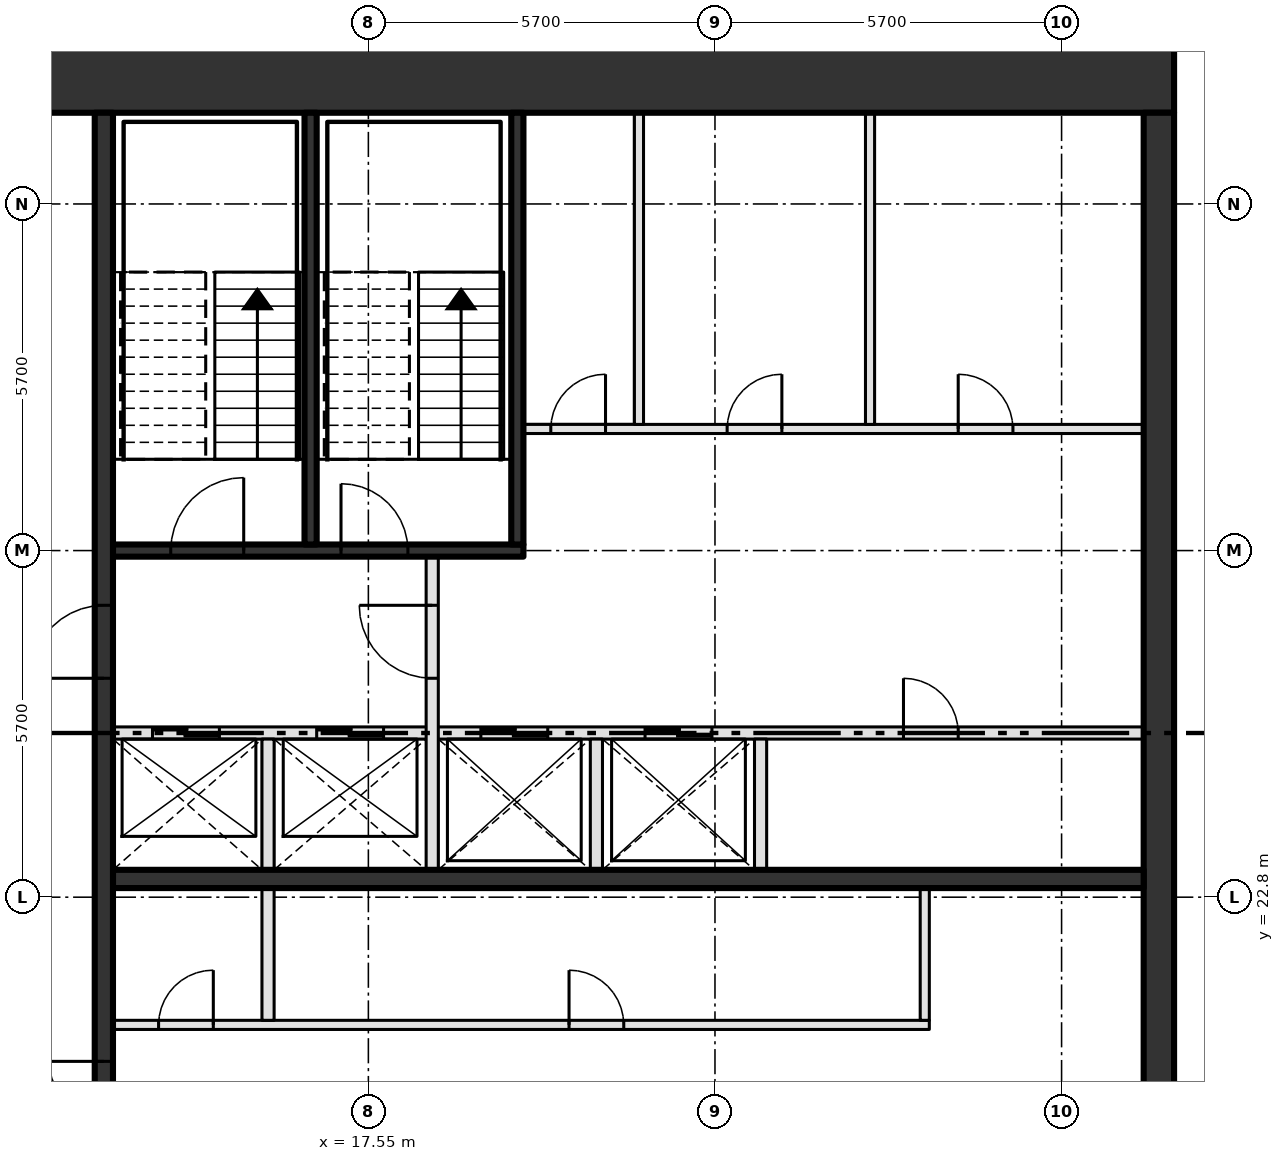
"""IFC4 building model, lengths in metres.
Left out: names, types, materials, properties, quantities, classifications, styles, units other than length and angle.
Written with IfcOpenShell. Run it as: python <this file> out.ifc"""

import sys

from ifc_helpers import new_model, si_unit, direction, frame, frame_2d, origin, place, context, subcontext, project, spatial, rectangle, extrude, element, fill, save


model = new_model("IFC4")
c1 = context("Model", 3, precision=1e-05, world=origin(), true_north=direction((0.0, 1.0)))
c2 = subcontext(c1, "Body", "Model", "MODEL_VIEW")
j1 = project(units=[si_unit("LENGTHUNIT", "METRE"), si_unit("PLANEANGLEUNIT", "RADIAN")], contexts=[c1])
p1 = place(None, origin())
s1 = spatial("IfcSite", under=j1, at=p1, CompositionType="ELEMENT")
p2 = place(p1, origin())
s2 = spatial("IfcBuilding", under=s1, at=p2, CompositionType="ELEMENT")
p3 = place(p2, frame((0.0, 0.0, 391.8)))
s3 = spatial("IfcBuildingStorey", under=s2, at=p3, CompositionType="ELEMENT", Elevation=391.8)
p4 = place(p3, frame((8.0, 36.3, -0.3), z_axis=(0.0, 0.0, 1.0), x_axis=(1.0, 0.0, 0.0)))
e1 = element("IfcWall", 1, at=p4, inside=s3, PredefinedType="SHEAR", context=c2, shape_type="SweptSolid", body=[
    extrude(rectangle(XDim=22.8, YDim=1.2, at=frame_2d((11.4, 0.0))), origin(), (0.0, 0.0, 1.0), 4.2),
])
p5 = place(p4, frame((2.3, 0.0, 0.3)))
e2 = element("IfcOpeningElement", 2, at=p5, cuts=e1, PredefinedType="OPENING", context=c2, shape_type="SweptSolid", body=[
    extrude(rectangle(XDim=1.8, YDim=2.1, at=frame_2d((0.9, 1.05))), frame((0.0, 0.61, 0.0), z_axis=(0.0, -1.0, 0.0), x_axis=(1.0, 0.0, 0.0)), (0.0, 0.0, 1.0), 1.22),
])
p6 = place(p3, frame((30.55, 14.6, -0.3), z_axis=(0.0, 0.0, 1.0), x_axis=(0.0, 1.0, 0.0)))
e3 = element("IfcWall", 3, at=p6, inside=s3, PredefinedType="SHEAR", context=c2, shape_type="SweptSolid", body=[
    extrude(rectangle(XDim=21.1, YDim=0.5, at=frame_2d((10.55, 0.0))), origin(), (0.0, 0.0, 1.0), 4.2),
])
p7 = place(p3, frame((13.35, 20.7, 0.0), z_axis=(0.0, 0.0, 1.0), x_axis=(1.0, 0.0, 0.0)))
e4 = element("IfcWall", 4, at=p7, inside=s3, PredefinedType="PARTITIONING", context=c2, shape_type="SweptSolid", body=[
    extrude(rectangle(XDim=13.425, YDim=0.15, at=frame_2d((6.712, 0.0))), origin(), (0.0, 0.0, 1.0), 3.9),
])
p8 = place(p7, frame((0.75, 0.0, 0.0)))
e5 = element("IfcOpeningElement", 5, at=p8, cuts=e4, PredefinedType="OPENING", context=c2, shape_type="SweptSolid", body=[
    extrude(rectangle(XDim=0.9, YDim=2.1, at=frame_2d((0.45, 1.05))), frame((0.0, 0.085, 0.0), z_axis=(0.0, -1.0, 0.0), x_axis=(1.0, 0.0, 0.0)), (0.0, 0.0, 1.0), 0.17),
])
p9 = place(p7, frame((7.5, 0.0, 0.0)))
e6 = element("IfcOpeningElement", 6, at=p9, cuts=e4, PredefinedType="OPENING", context=c2, shape_type="SweptSolid", body=[
    extrude(rectangle(XDim=0.9, YDim=2.1, at=frame_2d((0.45, 1.05))), frame((0.0, 0.085, 0.0), z_axis=(0.0, -1.0, 0.0), x_axis=(1.0, 0.0, 0.0)), (0.0, 0.0, 1.0), 0.17),
])
p10 = place(p3, frame((13.35, 23.1, 0.0), z_axis=(0.0, 0.0, 1.0), x_axis=(1.0, 0.0, 0.0)))
e7 = element("IfcWall", 7, at=p10, inside=s3, PredefinedType="SHEAR", context=c2, shape_type="SweptSolid", body=[
    extrude(rectangle(XDim=16.95, YDim=0.3, at=frame_2d((8.475, 0.0))), origin(), (0.0, 0.0, 1.0), 3.9),
])
p11 = place(p3, frame((13.35, 25.5, 0.0), z_axis=(0.0, 0.0, 1.0), x_axis=(1.0, 0.0, 0.0)))
e8 = element("IfcWall", 8, at=p11, inside=s3, PredefinedType="SOLIDWALL", context=c2, shape_type="SweptSolid", body=[
    extrude(rectangle(XDim=16.95, YDim=0.2, at=frame_2d((8.475, 0.0))), origin(), (0.0, 0.0, 1.0), 3.9),
])
p12 = place(p11, frame((0.65, 0.0, 0.0)))
e9 = element("IfcOpeningElement", 9, at=p12, cuts=e8, PredefinedType="OPENING", context=c2, shape_type="SweptSolid", body=[
    extrude(rectangle(XDim=1.1, YDim=2.1, at=frame_2d((0.55, 1.05))), frame((0.0, 0.11, 0.0), z_axis=(0.0, -1.0, 0.0), x_axis=(1.0, 0.0, 0.0)), (0.0, 0.0, 1.0), 0.22),
])
p13 = place(p11, frame((3.35, 0.0, 0.0)))
e10 = element("IfcOpeningElement", 10, at=p13, cuts=e8, PredefinedType="OPENING", context=c2, shape_type="SweptSolid", body=[
    extrude(rectangle(XDim=1.1, YDim=2.1, at=frame_2d((0.55, 1.05))), frame((0.0, 0.11, 0.0), z_axis=(0.0, -1.0, 0.0), x_axis=(1.0, 0.0, 0.0)), (0.0, 0.0, 1.0), 0.22),
])
p14 = place(p11, frame((6.05, 0.0, 0.0)))
e11 = element("IfcOpeningElement", 11, at=p14, cuts=e8, PredefinedType="OPENING", context=c2, shape_type="SweptSolid", body=[
    extrude(rectangle(XDim=1.1, YDim=2.1, at=frame_2d((0.55, 1.05))), frame((0.0, 0.11, 0.0), z_axis=(0.0, -1.0, 0.0), x_axis=(1.0, 0.0, 0.0)), (0.0, 0.0, 1.0), 0.22),
])
p15 = place(p11, frame((8.75, 0.0, 0.0)))
e12 = element("IfcOpeningElement", 12, at=p15, cuts=e8, PredefinedType="OPENING", context=c2, shape_type="SweptSolid", body=[
    extrude(rectangle(XDim=1.1, YDim=2.1, at=frame_2d((0.55, 1.05))), frame((0.0, 0.11, 0.0), z_axis=(0.0, -1.0, 0.0), x_axis=(1.0, 0.0, 0.0)), (0.0, 0.0, 1.0), 0.22),
])
p16 = place(p11, frame((13.0, 0.0, 0.0)))
e13 = element("IfcOpeningElement", 13, at=p16, cuts=e8, PredefinedType="OPENING", context=c2, shape_type="SweptSolid", body=[
    extrude(rectangle(XDim=0.9, YDim=2.1, at=frame_2d((0.45, 1.05))), frame((0.0, 0.11, 0.0), z_axis=(0.0, -1.0, 0.0), x_axis=(1.0, 0.0, 0.0)), (0.0, 0.0, 1.0), 0.22),
])
p17 = place(p3, frame((13.35, 28.5, 0.0), z_axis=(0.0, 0.0, 1.0), x_axis=(1.0, 0.0, 0.0)))
e14 = element("IfcWall", 14, at=p17, inside=s3, PredefinedType="SOLIDWALL", context=c2, shape_type="SweptSolid", body=[
    extrude(rectangle(XDim=6.75, YDim=0.2, at=frame_2d((3.375, 0.0))), origin(), (0.0, 0.0, 1.0), 3.9),
])
p18 = place(p17, frame((0.95, 0.0, 0.0)))
e15 = element("IfcOpeningElement", 15, at=p18, cuts=e14, PredefinedType="OPENING", context=c2, shape_type="SweptSolid", body=[
    extrude(rectangle(XDim=1.2, YDim=2.1, at=frame_2d((0.6, 1.05))), frame((0.0, 0.11, 0.0), z_axis=(0.0, -1.0, 0.0), x_axis=(1.0, 0.0, 0.0)), (0.0, 0.0, 1.0), 0.22),
])
p19 = place(p17, frame((3.75, 0.0, 0.0)))
e16 = element("IfcOpeningElement", 16, at=p19, cuts=e14, PredefinedType="OPENING", context=c2, shape_type="SweptSolid", body=[
    extrude(rectangle(XDim=1.1, YDim=2.1, at=frame_2d((0.55, 1.05))), frame((0.0, 0.11, 0.0), z_axis=(0.0, -1.0, 0.0), x_axis=(1.0, 0.0, 0.0)), (0.0, 0.0, 1.0), 0.22),
])
p20 = place(p3, frame((20.1, 30.5, 0.0), z_axis=(0.0, 0.0, 1.0), x_axis=(1.0, 0.0, 0.0)))
e17 = element("IfcWall", 17, at=p20, inside=s3, PredefinedType="PARTITIONING", context=c2, shape_type="SweptSolid", body=[
    extrude(rectangle(XDim=10.2, YDim=0.15, at=frame_2d((5.1, 0.0))), origin(), (0.0, 0.0, 1.0), 3.9),
])
p21 = place(p20, frame((0.45, 0.0, 0.0)))
e18 = element("IfcOpeningElement", 18, at=p21, cuts=e17, PredefinedType="OPENING", context=c2, shape_type="SweptSolid", body=[
    extrude(rectangle(XDim=0.9, YDim=2.1, at=frame_2d((0.45, 1.05))), frame((0.0, 0.085, 0.0), z_axis=(0.0, -1.0, 0.0), x_axis=(1.0, 0.0, 0.0)), (0.0, 0.0, 1.0), 0.17),
])
p22 = place(p20, frame((3.35, 0.0, 0.0)))
e19 = element("IfcOpeningElement", 19, at=p22, cuts=e17, PredefinedType="OPENING", context=c2, shape_type="SweptSolid", body=[
    extrude(rectangle(XDim=0.9, YDim=2.1, at=frame_2d((0.45, 1.05))), frame((0.0, 0.085, 0.0), z_axis=(0.0, -1.0, 0.0), x_axis=(1.0, 0.0, 0.0)), (0.0, 0.0, 1.0), 0.17),
])
p23 = place(p20, frame((7.15, 0.0, 0.0)))
e20 = element("IfcOpeningElement", 20, at=p23, cuts=e17, PredefinedType="OPENING", context=c2, shape_type="SweptSolid", body=[
    extrude(rectangle(XDim=0.9, YDim=2.1, at=frame_2d((0.45, 1.05))), frame((0.0, 0.085, 0.0), z_axis=(0.0, -1.0, 0.0), x_axis=(1.0, 0.0, 0.0)), (0.0, 0.0, 1.0), 0.17),
])
p24 = place(p3, frame((13.2, 14.6, 0.0), z_axis=(0.0, 0.0, 1.0), x_axis=(0.0, 1.0, 0.0)))
e21 = element("IfcWall", 21, at=p24, inside=s3, PredefinedType="SHEAR", context=c2, shape_type="SweptSolid", body=[
    extrude(rectangle(XDim=21.1, YDim=0.3, at=frame_2d((10.55, 0.0))), origin(), (0.0, 0.0, 1.0), 3.9),
])
p25 = place(p24, frame((3.7, 0.0, 0.0)))
e22 = element("IfcOpeningElement", 22, at=p25, cuts=e21, PredefinedType="OPENING", context=c2, shape_type="SweptSolid", body=[
    extrude(rectangle(XDim=1.8, YDim=2.1, at=frame_2d((0.9, 1.05))), frame((0.0, 0.16, 0.0), z_axis=(0.0, -1.0, 0.0), x_axis=(1.0, 0.0, 0.0)), (0.0, 0.0, 1.0), 0.32),
])
p26 = place(p24, frame((11.8, 0.0, 0.0)))
e23 = element("IfcOpeningElement", 23, at=p26, cuts=e21, PredefinedType="OPENING", context=c2, shape_type="SweptSolid", body=[
    extrude(rectangle(XDim=1.2, YDim=2.1, at=frame_2d((0.6, 1.05))), frame((0.0, 0.16, 0.0), z_axis=(0.0, -1.0, 0.0), x_axis=(1.0, 0.0, 0.0)), (0.0, 0.0, 1.0), 0.32),
])
p27 = place(p3, frame((15.9, 20.775, 0.0), z_axis=(0.0, 0.0, 1.0), x_axis=(0.0, 1.0, 0.0)))
e24 = element("IfcWall", 24, at=p27, inside=s3, PredefinedType="SOLIDWALL", context=c2, shape_type="SweptSolid", body=[
    extrude(rectangle(XDim=4.625, YDim=0.2, at=frame_2d((2.312, 0.0))), origin(), (0.0, 0.0, 1.0), 3.9),
])
p28 = place(p3, frame((16.6, 28.6, 0.0), z_axis=(0.0, 0.0, 1.0), x_axis=(0.0, 1.0, 0.0)))
e25 = element("IfcWall", 25, at=p28, inside=s3, PredefinedType="SOLIDWALL", context=c2, shape_type="SweptSolid", body=[
    extrude(rectangle(XDim=7.1, YDim=0.2, at=frame_2d((3.55, 0.0))), origin(), (0.0, 0.0, 1.0), 3.9),
])
p29 = place(p3, frame((18.6, 23.25, 0.0), z_axis=(0.0, 0.0, 1.0), x_axis=(0.0, 1.0, 0.0)))
e26 = element("IfcWall", 26, at=p29, inside=s3, PredefinedType="SOLIDWALL", context=c2, shape_type="SweptSolid", body=[
    extrude(rectangle(XDim=5.15, YDim=0.2, at=frame_2d((2.575, 0.0))), origin(), (0.0, 0.0, 1.0), 3.9),
])
p30 = place(p29, frame((3.15, 0.0, 0.0)))
e27 = element("IfcOpeningElement", 27, at=p30, cuts=e26, PredefinedType="OPENING", context=c2, shape_type="SweptSolid", body=[
    extrude(rectangle(XDim=1.2, YDim=2.1, at=frame_2d((0.6, 1.05))), frame((0.0, 0.11, 0.0), z_axis=(0.0, -1.0, 0.0), x_axis=(1.0, 0.0, 0.0)), (0.0, 0.0, 1.0), 0.22),
])
p31 = place(p3, frame((20.0, 28.6, 0.0), z_axis=(0.0, 0.0, 1.0), x_axis=(0.0, 1.0, 0.0)))
e28 = element("IfcWall", 28, at=p31, inside=s3, PredefinedType="SOLIDWALL", context=c2, shape_type="SweptSolid", body=[
    extrude(rectangle(XDim=7.1, YDim=0.2, at=frame_2d((3.55, 0.0))), origin(), (0.0, 0.0, 1.0), 3.9),
])
p32 = place(p3, frame((21.3, 23.25, 0.0), z_axis=(0.0, 0.0, 1.0), x_axis=(0.0, 1.0, 0.0)))
e29 = element("IfcWall", 29, at=p32, inside=s3, PredefinedType="SOLIDWALL", context=c2, shape_type="SweptSolid", body=[
    extrude(rectangle(XDim=2.15, YDim=0.2, at=frame_2d((1.075, 0.0))), origin(), (0.0, 0.0, 1.0), 3.9),
])
p33 = place(p3, frame((22.0, 30.575, 0.0), z_axis=(0.0, 0.0, 1.0), x_axis=(0.0, 1.0, 0.0)))
e30 = element("IfcWall", 30, at=p33, inside=s3, PredefinedType="PARTITIONING", context=c2, shape_type="SweptSolid", body=[
    extrude(rectangle(XDim=5.125, YDim=0.15, at=frame_2d((2.562, 0.0))), origin(), (0.0, 0.0, 1.0), 3.9),
])
p34 = place(p3, frame((24.0, 23.25, 0.0), z_axis=(0.0, 0.0, 1.0), x_axis=(0.0, 1.0, 0.0)))
e31 = element("IfcWall", 31, at=p34, inside=s3, PredefinedType="SOLIDWALL", context=c2, shape_type="SweptSolid", body=[
    extrude(rectangle(XDim=2.15, YDim=0.2, at=frame_2d((1.075, 0.0))), origin(), (0.0, 0.0, 1.0), 3.9),
])
p35 = place(p3, frame((25.8, 30.575, 0.0), z_axis=(0.0, 0.0, 1.0), x_axis=(0.0, 1.0, 0.0)))
e32 = element("IfcWall", 32, at=p35, inside=s3, PredefinedType="PARTITIONING", context=c2, shape_type="SweptSolid", body=[
    extrude(rectangle(XDim=5.125, YDim=0.15, at=frame_2d((2.562, 0.0))), origin(), (0.0, 0.0, 1.0), 3.9),
])
p36 = place(p3, frame((26.7, 20.775, 0.0), z_axis=(0.0, 0.0, 1.0), x_axis=(0.0, 1.0, 0.0)))
e33 = element("IfcWall", 33, at=p36, inside=s3, PredefinedType="PARTITIONING", context=c2, shape_type="SweptSolid", body=[
    extrude(rectangle(XDim=2.175, YDim=0.15, at=frame_2d((1.087, 0.0))), origin(), (0.0, 0.0, 1.0), 3.9),
])
p37 = place(p12, origin())
e34 = element("IfcDoor", 34, at=p37, inside=s3, OperationType="SLIDING_TO_LEFT", PredefinedType="DOOR", context=c2, shape_type="SweptSolid", body=[
    extrude(rectangle(XDim=1.1, YDim=2.1, at=frame_2d((0.55, 1.05))), frame((0.0, 0.025, 0.0), z_axis=(0.0, -1.0, 0.0), x_axis=(1.0, 0.0, 0.0)), (0.0, 0.0, 1.0), 0.05),
])
fill(e9, e34)
p38 = place(p13, origin())
e35 = element("IfcDoor", 35, at=p38, inside=s3, OperationType="SLIDING_TO_LEFT", PredefinedType="DOOR", context=c2, shape_type="SweptSolid", body=[
    extrude(rectangle(XDim=1.1, YDim=2.1, at=frame_2d((0.55, 1.05))), frame((0.0, 0.025, 0.0), z_axis=(0.0, -1.0, 0.0), x_axis=(1.0, 0.0, 0.0)), (0.0, 0.0, 1.0), 0.05),
])
fill(e10, e35)
p39 = place(p14, origin())
e36 = element("IfcDoor", 36, at=p39, inside=s3, OperationType="SLIDING_TO_LEFT", PredefinedType="DOOR", context=c2, shape_type="SweptSolid", body=[
    extrude(rectangle(XDim=1.1, YDim=2.1, at=frame_2d((0.55, 1.05))), frame((0.0, 0.025, 0.0), z_axis=(0.0, -1.0, 0.0), x_axis=(1.0, 0.0, 0.0)), (0.0, 0.0, 1.0), 0.05),
])
fill(e11, e36)
p40 = place(p15, origin())
e37 = element("IfcDoor", 37, at=p40, inside=s3, OperationType="SLIDING_TO_LEFT", PredefinedType="DOOR", context=c2, shape_type="SweptSolid", body=[
    extrude(rectangle(XDim=1.1, YDim=2.1, at=frame_2d((0.55, 1.05))), frame((0.0, 0.025, 0.0), z_axis=(0.0, -1.0, 0.0), x_axis=(1.0, 0.0, 0.0)), (0.0, 0.0, 1.0), 0.05),
])
fill(e12, e37)
p41 = place(p8, origin())
e38 = element("IfcDoor", 38, at=p41, inside=s3, OperationType="SINGLE_SWING_RIGHT", PredefinedType="DOOR", context=c2, shape_type="SweptSolid", body=[
    extrude(rectangle(XDim=0.9, YDim=2.1, at=frame_2d((0.45, 1.05))), frame((0.0, 0.025, 0.0), z_axis=(0.0, -1.0, 0.0), x_axis=(1.0, 0.0, 0.0)), (0.0, 0.0, 1.0), 0.05),
])
fill(e5, e38)
p42 = place(p9, origin())
e39 = element("IfcDoor", 39, at=p42, inside=s3, OperationType="SINGLE_SWING_LEFT", PredefinedType="DOOR", context=c2, shape_type="SweptSolid", body=[
    extrude(rectangle(XDim=0.9, YDim=2.1, at=frame_2d((0.45, 1.05))), frame((0.0, 0.025, 0.0), z_axis=(0.0, -1.0, 0.0), x_axis=(1.0, 0.0, 0.0)), (0.0, 0.0, 1.0), 0.05),
])
fill(e6, e39)
p43 = place(p16, origin())
e40 = element("IfcDoor", 40, at=p43, inside=s3, OperationType="SINGLE_SWING_LEFT", PredefinedType="DOOR", context=c2, shape_type="SweptSolid", body=[
    extrude(rectangle(XDim=0.9, YDim=2.1, at=frame_2d((0.45, 1.05))), frame((0.0, 0.025, 0.0), z_axis=(0.0, -1.0, 0.0), x_axis=(1.0, 0.0, 0.0)), (0.0, 0.0, 1.0), 0.05),
])
fill(e13, e40)
p44 = place(p21, origin())
e41 = element("IfcDoor", 41, at=p44, inside=s3, OperationType="SINGLE_SWING_RIGHT", PredefinedType="DOOR", context=c2, shape_type="SweptSolid", body=[
    extrude(rectangle(XDim=0.9, YDim=2.1, at=frame_2d((0.45, 1.05))), frame((0.0, 0.025, 0.0), z_axis=(0.0, -1.0, 0.0), x_axis=(1.0, 0.0, 0.0)), (0.0, 0.0, 1.0), 0.05),
])
fill(e18, e41)
p45 = place(p22, origin())
e42 = element("IfcDoor", 42, at=p45, inside=s3, OperationType="SINGLE_SWING_RIGHT", PredefinedType="DOOR", context=c2, shape_type="SweptSolid", body=[
    extrude(rectangle(XDim=0.9, YDim=2.1, at=frame_2d((0.45, 1.05))), frame((0.0, 0.025, 0.0), z_axis=(0.0, -1.0, 0.0), x_axis=(1.0, 0.0, 0.0)), (0.0, 0.0, 1.0), 0.05),
])
fill(e19, e42)
p46 = place(p23, origin())
e43 = element("IfcDoor", 43, at=p46, inside=s3, OperationType="SINGLE_SWING_LEFT", PredefinedType="DOOR", context=c2, shape_type="SweptSolid", body=[
    extrude(rectangle(XDim=0.9, YDim=2.1, at=frame_2d((0.45, 1.05))), frame((0.0, 0.025, 0.0), z_axis=(0.0, -1.0, 0.0), x_axis=(1.0, 0.0, 0.0)), (0.0, 0.0, 1.0), 0.05),
])
fill(e20, e43)
p47 = place(p18, origin())
e44 = element("IfcDoor", 44, at=p47, inside=s3, OperationType="SINGLE_SWING_RIGHT", PredefinedType="DOOR", context=c2, shape_type="SweptSolid", body=[
    extrude(rectangle(XDim=1.2, YDim=2.1, at=frame_2d((0.6, 1.05))), frame((0.0, 0.025, 0.0), z_axis=(0.0, -1.0, 0.0), x_axis=(1.0, 0.0, 0.0)), (0.0, 0.0, 1.0), 0.05),
])
fill(e15, e44)
p48 = place(p19, origin())
e45 = element("IfcDoor", 45, at=p48, inside=s3, OperationType="SINGLE_SWING_LEFT", PredefinedType="DOOR", context=c2, shape_type="SweptSolid", body=[
    extrude(rectangle(XDim=1.1, YDim=2.1, at=frame_2d((0.55, 1.05))), frame((0.0, 0.025, 0.0), z_axis=(0.0, -1.0, 0.0), x_axis=(1.0, 0.0, 0.0)), (0.0, 0.0, 1.0), 0.05),
])
fill(e16, e45)
p49 = place(p25, origin())
e46 = element("IfcDoor", 46, at=p49, inside=s3, OperationType="DOUBLE_DOOR_SINGLE_SWING", PredefinedType="DOOR", context=c2, shape_type="SweptSolid", body=[
    extrude(rectangle(XDim=1.8, YDim=2.1, at=frame_2d((0.9, 1.05))), frame((0.0, 0.025, 0.0), z_axis=(0.0, -1.0, 0.0), x_axis=(1.0, 0.0, 0.0)), (0.0, 0.0, 1.0), 0.05),
])
fill(e22, e46)
p50 = place(p26, origin())
e47 = element("IfcDoor", 47, at=p50, inside=s3, OperationType="SINGLE_SWING_LEFT", PredefinedType="DOOR", context=c2, shape_type="SweptSolid", body=[
    extrude(rectangle(XDim=1.2, YDim=2.1, at=frame_2d((0.6, 1.05))), frame((0.0, 0.025, 0.0), z_axis=(0.0, -1.0, 0.0), x_axis=(1.0, 0.0, 0.0)), (0.0, 0.0, 1.0), 0.05),
])
fill(e23, e47)
p51 = place(p30, origin())
e48 = element("IfcDoor", 48, at=p51, inside=s3, OperationType="SINGLE_SWING_RIGHT", PredefinedType="DOOR", context=c2, shape_type="SweptSolid", body=[
    extrude(rectangle(XDim=1.2, YDim=2.1, at=frame_2d((0.6, 1.05))), frame((0.0, 0.025, 0.0), z_axis=(0.0, -1.0, 0.0), x_axis=(1.0, 0.0, 0.0)), (0.0, 0.0, 1.0), 0.05),
])
fill(e27, e48)
save(model, sys.argv[1])
